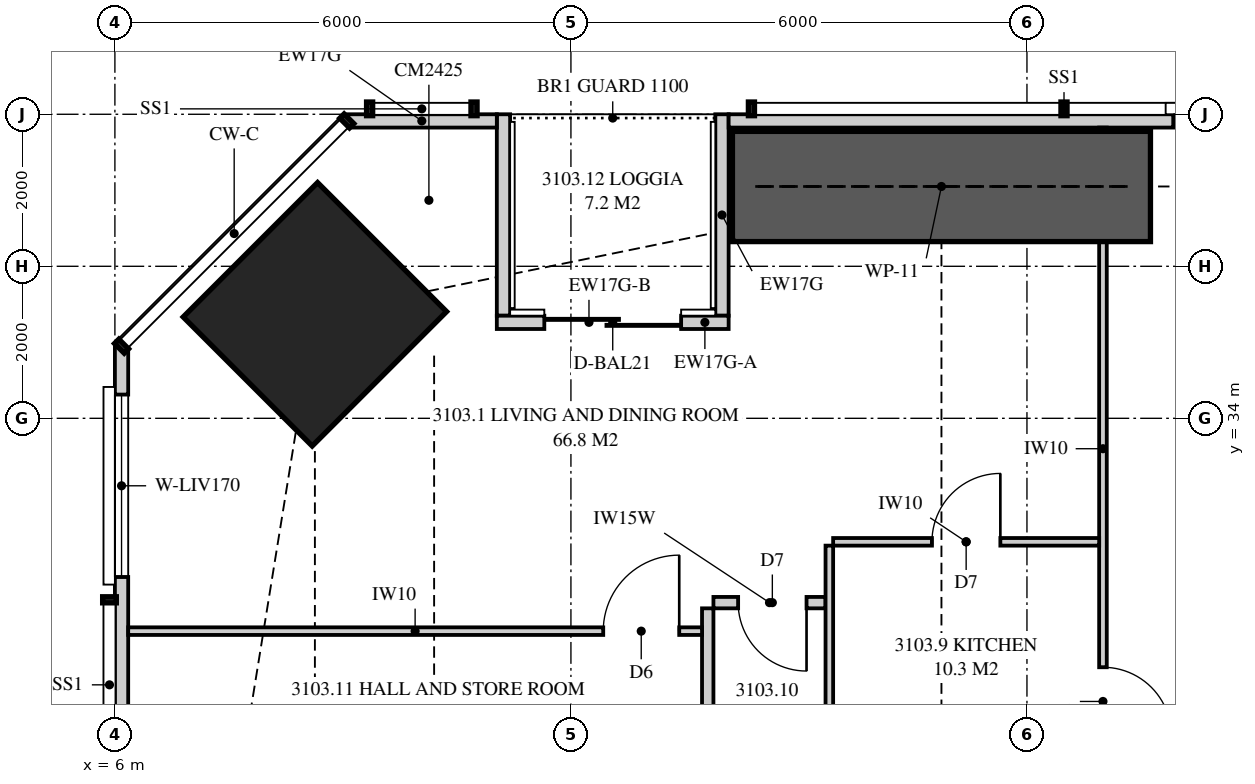
"""IFC4 building model, lengths in metres.
Left out: names, types, materials, properties, quantities, classifications, styles, units other than length and angle.
Written with IfcOpenShell. Run it as: python <this file> out.ifc"""

import sys

from ifc_helpers import new_model, si_unit, direction, frame, frame_2d, origin, origin_2d, place, context, subcontext, project, spatial, polyline, rectangle, outline, extrude, element, fill, save


model = new_model("IFC4")
c1 = context("Model", 3, precision=1e-05, world=origin(), true_north=direction((0.0, 1.0)))
c2 = subcontext(c1, "Body", "Model", "MODEL_VIEW")
j1 = project(units=[si_unit("LENGTHUNIT", "METRE"), si_unit("PLANEANGLEUNIT", "RADIAN")], contexts=[c1])
p1 = place(None, origin())
s1 = spatial("IfcSite", under=j1, at=p1, CompositionType="ELEMENT")
p2 = place(p1, origin())
s2 = spatial("IfcBuilding", under=s1, at=p2, CompositionType="ELEMENT")
p3 = place(p2, frame((0.0, 0.0, 114.9)))
s3 = spatial("IfcBuildingStorey", under=s2, at=p3, CompositionType="ELEMENT", Elevation=114.9)
p4 = place(p3, frame((8.631, 35.369, 0.0), z_axis=(0.0, 0.0, 1.0), x_axis=(0.707106781187, -0.707106781187, 0.0)))
e1 = element("IfcColumn", 1, at=p4, inside=s3, PredefinedType="COLUMN", context=c2, shape_type="SweptSolid", body=[
    extrude(rectangle(XDim=2.4, YDim=2.5, at=origin_2d()), origin(), (0.0, 0.0, 1.0), 3.35),
])
p5 = place(p3, frame((41.449, 37.913, 0.0), z_axis=(0.0, 0.0, 1.0), x_axis=(-1.0, 0.0, 0.0)))
e2 = element("IfcWall", 2, at=p5, inside=s3, PredefinedType="SOLIDWALL", context=c2, shape_type="SweptSolid", body=[
    extrude(outline(polyline([(0.0, 0.0), (27.374, 0.0), (27.374, 3.11), (24.777, 3.11), (24.777, 2.15), (24.732, 2.15), (24.732, 3.11), (24.574, 3.11), (24.574, 2.15), (2.824, 2.15), (2.824, 3.11), (2.666, 3.11), (2.666, 2.15), (2.62, 2.15), (2.62, 3.11), (0.0, 3.11), (0.0, 0.0)])), frame((0.0, 0.087, 0.0), z_axis=(0.0, -1.0, 0.0), x_axis=(1.0, 0.0, 0.0)), (0.0, 0.0, 1.0), 0.175),
])
p6 = place(p5, frame((5.699, 0.0, 0.4)))
e3 = element("IfcOpeningElement", 3, at=p6, cuts=e2, PredefinedType="OPENING", context=c2, shape_type="SweptSolid", body=[
    extrude(rectangle(XDim=1.8, YDim=1.7, at=frame_2d((0.9, 0.85))), frame((0.0, 0.097, 0.0), z_axis=(0.0, -1.0, 0.0), x_axis=(1.0, 0.0, 0.0)), (0.0, 0.0, 1.0), 0.195),
])
p7 = place(p5, frame((9.034, 0.0, 0.4)))
e4 = element("IfcOpeningElement", 4, at=p7, cuts=e2, PredefinedType="OPENING", context=c2, shape_type="SweptSolid", body=[
    extrude(rectangle(XDim=1.8, YDim=1.7, at=frame_2d((0.9, 0.85))), frame((0.0, 0.097, 0.0), z_axis=(0.0, -1.0, 0.0), x_axis=(1.0, 0.0, 0.0)), (0.0, 0.0, 1.0), 0.195),
])
p8 = place(p5, frame((16.558, 0.0, 0.4)))
e5 = element("IfcOpeningElement", 5, at=p8, cuts=e2, PredefinedType="OPENING", context=c2, shape_type="SweptSolid", body=[
    extrude(rectangle(XDim=1.8, YDim=1.7, at=frame_2d((0.9, 0.85))), frame((0.0, 0.097, 0.0), z_axis=(0.0, -1.0, 0.0), x_axis=(1.0, 0.0, 0.0)), (0.0, 0.0, 1.0), 0.195),
])
p9 = place(p5, frame((19.724, 0.0, 0.4)))
e6 = element("IfcOpeningElement", 6, at=p9, cuts=e2, PredefinedType="OPENING", context=c2, shape_type="SweptSolid", body=[
    extrude(rectangle(XDim=1.8, YDim=1.7, at=frame_2d((0.9, 0.85))), frame((0.0, 0.097, 0.0), z_axis=(0.0, -1.0, 0.0), x_axis=(1.0, 0.0, 0.0)), (0.0, 0.0, 1.0), 0.195),
])
p10 = place(p3, frame((11.025, 37.913, 0.0), z_axis=(0.0, 0.0, 1.0), x_axis=(-1.0, 0.0, 0.0)))
e7 = element("IfcWall", 7, at=p10, inside=s3, PredefinedType="SOLIDWALL", context=c2, shape_type="SweptSolid", body=[
    extrude(rectangle(XDim=1.974, YDim=0.175, at=frame_2d((0.987, 0.0))), origin(), (0.0, 0.0, 1.0), 3.11),
])
p11 = place(p3, frame((14.075, 35.262, 0.0), z_axis=(0.0, 0.0, 1.0), x_axis=(-1.0, 0.0, 0.0)))
e8 = element("IfcWall", 8, at=p11, inside=s3, PredefinedType="SOLIDWALL", context=c2, shape_type="SweptSolid", body=[
    extrude(rectangle(XDim=0.625, YDim=0.175, at=frame_2d((0.312, 0.0))), origin(), (0.0, 0.0, 1.0), 3.11),
])
p12 = place(p3, frame((13.45, 35.262, 0.0), z_axis=(0.0, 0.0, 1.0), x_axis=(-1.0, 0.0, 0.0)))
e9 = element("IfcWall", 9, at=p12, inside=s3, PredefinedType="SOLIDWALL", context=c2, shape_type="SweptSolid", body=[
    extrude(rectangle(XDim=2.425, YDim=0.175, at=frame_2d((1.212, 0.0))), origin(), (0.0, 0.0, 1.0), 2.15),
])
p13 = place(p12, origin())
e10 = element("IfcOpeningElement", 10, at=p13, cuts=e9, PredefinedType="OPENING", context=c2, shape_type="SweptSolid", body=[
    extrude(rectangle(XDim=1.8, YDim=2.1, at=frame_2d((0.9, 1.05))), frame((0.0, 0.097, 0.0), z_axis=(0.0, -1.0, 0.0), x_axis=(1.0, 0.0, 0.0)), (0.0, 0.0, 1.0), 0.195),
])
p14 = place(p3, frame((13.988, 38.0, 0.0), z_axis=(0.0, 0.0, 1.0), x_axis=(0.0, -1.0, 0.0)))
e11 = element("IfcWall", 11, at=p14, inside=s3, PredefinedType="SOLIDWALL", context=c2, shape_type="SweptSolid", body=[
    extrude(outline(polyline([(0.0, 0.0), (2.65, 0.0), (2.65, 3.11), (2.373, 3.11), (2.373, 2.15), (0.705, 2.15), (0.705, 3.11), (0.0, 3.11), (0.0, 0.0)])), frame((0.0, 0.087, 0.0), z_axis=(0.0, -1.0, 0.0), x_axis=(1.0, 0.0, 0.0)), (0.0, 0.0, 1.0), 0.175),
])
p15 = place(p3, frame((11.113, 38.0, 0.0), z_axis=(0.0, 0.0, 1.0), x_axis=(0.0, -1.0, 0.0)))
e12 = element("IfcWall", 12, at=p15, inside=s3, PredefinedType="SOLIDWALL", context=c2, shape_type="SweptSolid", body=[
    extrude(outline(polyline([(0.0, 0.0), (2.65, 0.0), (2.65, 2.15), (1.291, 2.15), (1.291, 3.11), (0.0, 3.11), (0.0, 0.0)])), frame((0.0, 0.087, 0.0), z_axis=(0.0, -1.0, 0.0), x_axis=(1.0, 0.0, 0.0)), (0.0, 0.0, 1.0), 0.175),
])
p16 = place(p3, frame((6.087, 34.949, 0.0), z_axis=(0.0, 0.0, 1.0), x_axis=(0.0, -1.0, 0.0)))
e13 = element("IfcWall", 13, at=p16, inside=s3, PredefinedType="SOLIDWALL", context=c2, shape_type="SweptSolid", body=[
    extrude(outline(polyline([(0.0, 0.0), (14.532, 0.0), (14.532, 2.15), (9.949, 2.15), (9.949, 3.11), (9.823, 3.11), (9.823, 2.15), (9.73, 2.15), (9.73, 3.11), (0.0, 3.11), (0.0, 0.0)])), frame((0.0, 0.087, 0.0), z_axis=(0.0, -1.0, 0.0), x_axis=(1.0, 0.0, 0.0)), (0.0, 0.0, 1.0), 0.175),
])
p17 = place(p16, frame((0.636, 0.0, 0.4)))
e14 = element("IfcOpeningElement", 14, at=p17, cuts=e13, PredefinedType="OPENING", context=c2, shape_type="SweptSolid", body=[
    extrude(rectangle(XDim=2.4, YDim=1.7, at=frame_2d((1.2, 0.85))), frame((0.0, 0.097, 0.0), z_axis=(0.0, -1.0, 0.0), x_axis=(1.0, 0.0, 0.0)), (0.0, 0.0, 1.0), 0.195),
])
p18 = place(p16, frame((5.874, 0.0, 0.4)))
e15 = element("IfcOpeningElement", 15, at=p18, cuts=e13, PredefinedType="OPENING", context=c2, shape_type="SweptSolid", body=[
    extrude(rectangle(XDim=1.2, YDim=1.7, at=frame_2d((0.6, 0.85))), frame((0.0, 0.097, 0.0), z_axis=(0.0, -1.0, 0.0), x_axis=(1.0, 0.0, 0.0)), (0.0, 0.0, 1.0), 0.195),
])
p19 = place(p3, frame((19.0, 37.825, 0.0), z_axis=(0.0, 0.0, 1.0), x_axis=(0.0, -1.0, 0.0)))
e16 = element("IfcWall", 16, at=p19, inside=s3, PredefinedType="PARTITIONING", context=c2, shape_type="SweptSolid", body=[
    extrude(outline(polyline([(0.529, 2.15), (0.0, 2.15), (0.0, 0.0), (0.529, 0.0), (0.529, 0.017), (1.021, 0.017), (1.021, 0.0), (8.45, 0.0), (8.45, 3.11), (1.635, 3.11), (1.635, 2.15), (1.021, 2.15), (1.021, 2.133), (0.529, 2.133), (0.529, 2.15)])), frame((0.0, 0.05, 0.0), z_axis=(0.0, -1.0, 0.0), x_axis=(1.0, 0.0, 0.0)), (0.0, 0.0, 1.0), 0.1),
])
p20 = place(p19, frame((7.1, 0.0, 0.0)))
e17 = element("IfcOpeningElement", 17, at=p20, cuts=e16, PredefinedType="OPENING", context=c2, shape_type="SweptSolid", body=[
    extrude(rectangle(XDim=0.9, YDim=2.1, at=frame_2d((0.45, 1.05))), frame((0.0, 0.06, 0.0), z_axis=(0.0, -1.0, 0.0), x_axis=(1.0, 0.0, 0.0)), (0.0, 0.0, 1.0), 0.12),
])
p21 = place(p3, frame((15.45, 32.375, 0.0), z_axis=(0.0, 0.0, 1.0), x_axis=(1.0, 0.0, 0.0)))
e18 = element("IfcWall", 18, at=p21, inside=s3, PredefinedType="PARTITIONING", context=c2, shape_type="SweptSolid", body=[
    extrude(outline(polyline([(0.0, 0.0), (3.5, 0.0), (3.5, 3.11), (1.712, 3.11), (1.712, 2.541), (1.138, 2.541), (1.138, 3.11), (0.0, 3.11), (0.0, 0.0)])), frame((0.0, 0.05, 0.0), z_axis=(0.0, -1.0, 0.0), x_axis=(1.0, 0.0, 0.0)), (0.0, 0.0, 1.0), 0.1),
])
p22 = place(p21, frame((1.3, 0.0, 0.0)))
e19 = element("IfcOpeningElement", 19, at=p22, cuts=e18, PredefinedType="OPENING", context=c2, shape_type="SweptSolid", body=[
    extrude(rectangle(XDim=0.9, YDim=2.1, at=frame_2d((0.45, 1.05))), frame((0.0, 0.06, 0.0), z_axis=(0.0, -1.0, 0.0), x_axis=(1.0, 0.0, 0.0)), (0.0, 0.0, 1.0), 0.12),
])
p23 = place(p3, frame((15.4, 32.325, 0.0), z_axis=(0.0, 0.0, 1.0), x_axis=(0.0, -1.0, 0.0)))
e20 = element("IfcWall", 20, at=p23, inside=s3, PredefinedType="PARTITIONING", context=c2, shape_type="SweptSolid", body=[
    extrude(rectangle(XDim=2.95, YDim=0.1, at=frame_2d((1.475, 0.0))), origin(), (0.0, 0.0, 1.0), 3.11),
])
p24 = place(p3, frame((13.875, 31.575, 0.0), z_axis=(0.0, 0.0, 1.0), x_axis=(1.0, 0.0, 0.0)))
e21 = element("IfcWall", 21, at=p24, inside=s3, PredefinedType="PLUMBINGWALL", context=c2, shape_type="SweptSolid", body=[
    extrude(rectangle(XDim=1.475, YDim=0.15, at=frame_2d((0.738, 0.0))), origin(), (0.0, 0.0, 1.0), 3.11),
])
p25 = place(p24, frame((0.325, 0.0, 0.0)))
e22 = element("IfcOpeningElement", 22, at=p25, cuts=e21, PredefinedType="OPENING", context=c2, shape_type="SweptSolid", body=[
    extrude(rectangle(XDim=0.9, YDim=2.1, at=frame_2d((0.45, 1.05))), frame((0.0, 0.085, 0.0), z_axis=(0.0, -1.0, 0.0), x_axis=(1.0, 0.0, 0.0)), (0.0, 0.0, 1.0), 0.17),
])
p26 = place(p3, frame((13.8, 31.5, 0.0), z_axis=(0.0, 0.0, 1.0), x_axis=(0.0, -1.0, 0.0)))
e23 = element("IfcWall", 23, at=p26, inside=s3, PredefinedType="PLUMBINGWALL", context=c2, shape_type="SweptSolid", body=[
    extrude(rectangle(XDim=2.125, YDim=0.15, at=frame_2d((1.062, 0.0))), origin(), (0.0, 0.0, 1.0), 3.11),
])
p27 = place(p3, frame((6.175, 31.2, 0.0), z_axis=(0.0, 0.0, 1.0), x_axis=(1.0, 0.0, 0.0)))
e24 = element("IfcWall", 24, at=p27, inside=s3, PredefinedType="PARTITIONING", context=c2, shape_type="SweptSolid", body=[
    extrude(outline(polyline([(0.0, 0.0), (7.55, 0.0), (7.55, 3.11), (5.285, 3.11), (5.285, 2.51), (2.765, 2.51), (2.765, 3.11), (2.744, 3.11), (2.744, 2.541), (2.652, 2.541), (2.652, 2.15), (0.909, 2.15), (0.909, 3.11), (0.0, 3.11), (0.0, 0.0)])), frame((0.0, 0.05, 0.0), z_axis=(0.0, -1.0, 0.0), x_axis=(1.0, 0.0, 0.0)), (0.0, 0.0, 1.0), 0.1),
])
p28 = place(p27, frame((6.25, 0.0, 0.0)))
e25 = element("IfcOpeningElement", 25, at=p28, cuts=e24, PredefinedType="OPENING", context=c2, shape_type="SweptSolid", body=[
    extrude(rectangle(XDim=1.0, YDim=2.1, at=frame_2d((0.5, 1.05))), frame((0.0, 0.06, 0.0), z_axis=(0.0, -1.0, 0.0), x_axis=(1.0, 0.0, 0.0)), (0.0, 0.0, 1.0), 0.12),
])
p29 = place(p3, frame((14.125, 37.05, 0.0), z_axis=(0.0, 0.0, 1.0), x_axis=(1.0, 0.0, 0.0)))
e26 = element("IfcWall", 26, at=p29, inside=s3, PredefinedType="SHEAR", context=c2, shape_type="SweptSolid", body=[
    extrude(rectangle(XDim=5.5, YDim=1.45, at=frame_2d((2.75, 0.0))), origin(), (0.0, 0.0, 1.0), 3.35),
])
p30 = place(p9, origin())
e27 = element("IfcWindow", 27, at=p30, inside=s3, PartitioningType="SINGLE_PANEL", PredefinedType="WINDOW", context=c2, shape_type="SweptSolid", body=[
    extrude(rectangle(XDim=1.8, YDim=1.7, at=frame_2d((0.9, 0.85))), frame((0.0, 0.03, 0.0), z_axis=(0.0, -1.0, 0.0), x_axis=(1.0, 0.0, 0.0)), (0.0, 0.0, 1.0), 0.06),
])
fill(e6, e27)
p31 = place(p13, origin())
e28 = element("IfcDoor", 28, at=p31, inside=s3, OperationType="SLIDING_TO_LEFT", PredefinedType="DOOR", context=c2, shape_type="SweptSolid", body=[
    extrude(rectangle(XDim=1.8, YDim=2.1, at=frame_2d((0.9, 1.05))), frame((0.0, 0.025, 0.0), z_axis=(0.0, -1.0, 0.0), x_axis=(1.0, 0.0, 0.0)), (0.0, 0.0, 1.0), 0.05),
])
fill(e10, e28)
p32 = place(p17, origin())
e29 = element("IfcWindow", 29, at=p32, inside=s3, PartitioningType="SINGLE_PANEL", PredefinedType="WINDOW", context=c2, shape_type="SweptSolid", body=[
    extrude(rectangle(XDim=2.4, YDim=1.7, at=frame_2d((1.2, 0.85))), frame((0.0, 0.03, 0.0), z_axis=(0.0, -1.0, 0.0), x_axis=(1.0, 0.0, 0.0)), (0.0, 0.0, 1.0), 0.06),
])
fill(e14, e29)
p33 = place(p20, origin())
e30 = element("IfcDoor", 30, at=p33, inside=s3, OperationType="SINGLE_SWING_RIGHT", PredefinedType="DOOR", context=c2, shape_type="SweptSolid", body=[
    extrude(rectangle(XDim=0.9, YDim=2.1, at=frame_2d((0.45, 1.05))), frame((0.0, 0.025, 0.0), z_axis=(0.0, -1.0, 0.0), x_axis=(1.0, 0.0, 0.0)), (0.0, 0.0, 1.0), 0.05),
])
fill(e17, e30)
p34 = place(p22, origin())
e31 = element("IfcDoor", 31, at=p34, inside=s3, OperationType="SINGLE_SWING_RIGHT", PredefinedType="DOOR", context=c2, shape_type="SweptSolid", body=[
    extrude(rectangle(XDim=0.9, YDim=2.1, at=frame_2d((0.45, 1.05))), frame((0.0, 0.025, 0.0), z_axis=(0.0, -1.0, 0.0), x_axis=(1.0, 0.0, 0.0)), (0.0, 0.0, 1.0), 0.05),
])
fill(e19, e31)
p35 = place(p25, frame((0.9, 0.0, 0.0), z_axis=(0.0, 0.0, 1.0), x_axis=(-1.0, 0.0, 0.0)))
e32 = element("IfcDoor", 32, at=p35, inside=s3, OperationType="SINGLE_SWING_LEFT", PredefinedType="DOOR", context=c2, shape_type="SweptSolid", body=[
    extrude(rectangle(XDim=0.9, YDim=2.1, at=frame_2d((0.45, 1.05))), frame((0.0, 0.025, 0.0), z_axis=(0.0, -1.0, 0.0), x_axis=(1.0, 0.0, 0.0)), (0.0, 0.0, 1.0), 0.05),
])
fill(e22, e32)
p36 = place(p28, origin())
e33 = element("IfcDoor", 33, at=p36, inside=s3, OperationType="SINGLE_SWING_RIGHT", PredefinedType="DOOR", context=c2, shape_type="SweptSolid", body=[
    extrude(rectangle(XDim=1.0, YDim=2.1, at=frame_2d((0.5, 1.05))), frame((0.0, 0.025, 0.0), z_axis=(0.0, -1.0, 0.0), x_axis=(1.0, 0.0, 0.0)), (0.0, 0.0, 1.0), 0.05),
])
fill(e25, e33)
save(model, sys.argv[1])
